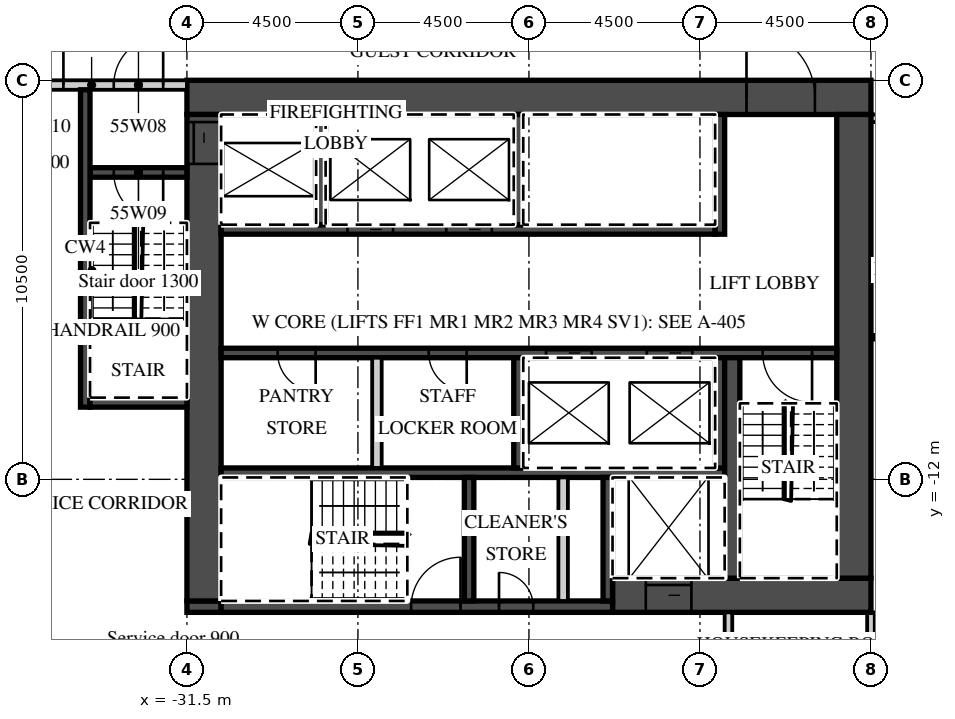
"""IFC4 building model, lengths in metres.
Left out: names, types, materials, properties, quantities, classifications, styles, units other than length and angle.
Written with IfcOpenShell. Run it as: python <this file> out.ifc"""

import sys

from ifc_helpers import new_model, si_unit, direction, frame, frame_2d, origin, place, context, subcontext, project, spatial, rectangle, extrude, element, fill, save


model = new_model("IFC4")
c1 = context("Model", 3, precision=1e-05, world=origin(), true_north=direction((0.0, 1.0)))
c2 = subcontext(c1, "Body", "Model", "MODEL_VIEW")
j1 = project(units=[si_unit("LENGTHUNIT", "METRE"), si_unit("PLANEANGLEUNIT", "RADIAN")], contexts=[c1])
p1 = place(None, origin())
s1 = spatial("IfcSite", under=j1, at=p1, CompositionType="ELEMENT")
p2 = place(p1, origin())
s2 = spatial("IfcBuilding", under=s1, at=p2, CompositionType="ELEMENT")
p3 = place(p2, frame((0.0, 0.0, 227.6)))
s3 = spatial("IfcBuildingStorey", under=s2, at=p3, CompositionType="ELEMENT", Elevation=227.6)
p4 = place(p3, frame((-13.5, -19.641, 0.0), z_axis=(0.0, 0.0, 1.0), x_axis=(0.0, 1.0, 0.0)))
e1 = element("IfcWall", 1, at=p4, inside=s3, PredefinedType="PARTITIONING", context=c2, shape_type="SweptSolid", body=[
    extrude(rectangle(XDim=4.141, YDim=0.2, at=frame_2d((2.071, 0.0))), origin(), (0.0, 0.0, 1.0), 3.02),
])
p5 = place(p3, frame((-13.5, -2.5, 0.0), z_axis=(0.0, 0.0, 1.0), x_axis=(1.0, 0.0, 0.0)))
e2 = element("IfcWall", 2, at=p5, inside=s3, PredefinedType="PARTITIONING", context=c2, shape_type="SweptSolid", body=[
    extrude(rectangle(XDim=27.0, YDim=0.2, at=frame_2d((13.5, 0.0))), origin(), (0.0, 0.0, 1.0), 3.02),
])
p6 = place(p5, frame((2.925, 0.0, 0.0)))
e3 = element("IfcOpeningElement", 3, at=p6, cuts=e2, PredefinedType="OPENING", context=c2, shape_type="SweptSolid", body=[
    extrude(rectangle(XDim=1.0, YDim=2.1, at=frame_2d((0.5, 1.05))), frame((0.0, 0.11, 0.0), z_axis=(0.0, -1.0, 0.0), x_axis=(1.0, 0.0, 0.0)), (0.0, 0.0, 1.0), 0.22),
])
p7 = place(p5, frame((9.863, 0.0, 0.0)))
e4 = element("IfcOpeningElement", 4, at=p7, cuts=e2, PredefinedType="OPENING", context=c2, shape_type="SweptSolid", body=[
    extrude(rectangle(XDim=1.2, YDim=2.1, at=frame_2d((0.6, 1.05))), frame((0.0, 0.11, 0.0), z_axis=(0.0, -1.0, 0.0), x_axis=(1.0, 0.0, 0.0)), (0.0, 0.0, 1.0), 0.22),
])
p8 = place(p5, frame((16.45, 0.0, 0.0)))
e5 = element("IfcOpeningElement", 5, at=p8, cuts=e2, PredefinedType="OPENING", context=c2, shape_type="SweptSolid", body=[
    extrude(rectangle(XDim=1.0, YDim=2.1, at=frame_2d((0.5, 1.05))), frame((0.0, 0.11, 0.0), z_axis=(0.0, -1.0, 0.0), x_axis=(1.0, 0.0, 0.0)), (0.0, 0.0, 1.0), 0.22),
])
p9 = place(p5, frame((20.925, 0.0, 0.0)))
e6 = element("IfcOpeningElement", 6, at=p9, cuts=e2, PredefinedType="OPENING", context=c2, shape_type="SweptSolid", body=[
    extrude(rectangle(XDim=1.0, YDim=2.1, at=frame_2d((0.5, 1.05))), frame((0.0, 0.11, 0.0), z_axis=(0.0, -1.0, 0.0), x_axis=(1.0, 0.0, 0.0)), (0.0, 0.0, 1.0), 0.22),
])
p10 = place(p5, frame((25.425, 0.0, 0.0)))
e7 = element("IfcOpeningElement", 7, at=p10, cuts=e2, PredefinedType="OPENING", context=c2, shape_type="SweptSolid", body=[
    extrude(rectangle(XDim=1.0, YDim=2.1, at=frame_2d((0.5, 1.05))), frame((0.0, 0.11, 0.0), z_axis=(0.0, -1.0, 0.0), x_axis=(1.0, 0.0, 0.0)), (0.0, 0.0, 1.0), 0.22),
])
p11 = place(p3, frame((-31.5, -1.95, 0.0), z_axis=(0.0, 0.0, 1.0), x_axis=(1.0, 0.0, 0.0)))
e8 = element("IfcWall", 8, at=p11, inside=s3, PredefinedType="SHEAR", context=c2, shape_type="SweptSolid", body=[
    extrude(rectangle(XDim=18.0, YDim=0.9, at=frame_2d((9.0, 0.0))), origin(), (0.0, 0.0, 1.0), 3.02),
])
p12 = place(p11, frame((14.725, 0.0, 0.0)))
e9 = element("IfcOpeningElement", 9, at=p12, cuts=e8, PredefinedType="OPENING", context=c2, shape_type="SweptSolid", body=[
    extrude(rectangle(XDim=1.8, YDim=2.1, at=frame_2d((0.9, 1.05))), frame((0.0, 0.46, 0.0), z_axis=(0.0, -1.0, 0.0), x_axis=(1.0, 0.0, 0.0)), (0.0, 0.0, 1.0), 0.92),
])
p13 = place(p3, frame((-20.3, -15.05, 0.0), z_axis=(0.0, 0.0, 1.0), x_axis=(1.0, 0.0, 0.0)))
e10 = element("IfcWall", 10, at=p13, inside=s3, PredefinedType="SHEAR", context=c2, shape_type="SweptSolid", body=[
    extrude(rectangle(XDim=6.8, YDim=0.9, at=frame_2d((3.4, 0.0))), origin(), (0.0, 0.0, 1.0), 3.02),
])
p14 = place(p13, frame((0.875, 0.0, 0.0)))
e11 = element("IfcOpeningElement", 11, at=p14, cuts=e10, PredefinedType="OPENING", context=c2, shape_type="SweptSolid", body=[
    extrude(rectangle(XDim=1.2, YDim=2.1, at=frame_2d((0.6, 1.05))), frame((0.0, 0.46, 0.0), z_axis=(0.0, -1.0, 0.0), x_axis=(1.0, 0.0, 0.0)), (0.0, 0.0, 1.0), 0.92),
])
p15 = place(p3, frame((-31.5, -15.35, 0.0), z_axis=(0.0, 0.0, 1.0), x_axis=(1.0, 0.0, 0.0)))
e12 = element("IfcWall", 12, at=p15, inside=s3, PredefinedType="SHEAR", context=c2, shape_type="SweptSolid", body=[
    extrude(rectangle(XDim=0.9, YDim=0.3, at=frame_2d((0.45, 0.0))), origin(), (0.0, 0.0, 1.0), 3.02),
])
p16 = place(p3, frame((-30.6, -15.35, 0.0), z_axis=(0.0, 0.0, 1.0), x_axis=(1.0, 0.0, 0.0)))
e13 = element("IfcWall", 13, at=p16, inside=s3, PredefinedType="SHEAR", context=c2, shape_type="SweptSolid", body=[
    extrude(rectangle(XDim=10.3, YDim=0.3, at=frame_2d((5.15, 0.0))), origin(), (0.0, 0.0, 1.0), 3.02),
])
p17 = place(p16, frame((5.0, 0.0, 0.0)))
e14 = element("IfcOpeningElement", 14, at=p17, cuts=e13, PredefinedType="OPENING", context=c2, shape_type="SweptSolid", body=[
    extrude(rectangle(XDim=1.3, YDim=2.1, at=frame_2d((0.65, 1.05))), frame((0.0, 0.16, 0.0), z_axis=(0.0, -1.0, 0.0), x_axis=(1.0, 0.0, 0.0)), (0.0, 0.0, 1.0), 0.32),
])
p18 = place(p16, frame((7.312, 0.0, 0.0)))
e15 = element("IfcOpeningElement", 15, at=p18, cuts=e13, PredefinedType="OPENING", context=c2, shape_type="SweptSolid", body=[
    extrude(rectangle(XDim=0.9, YDim=2.1, at=frame_2d((0.45, 1.05))), frame((0.0, 0.16, 0.0), z_axis=(0.0, -1.0, 0.0), x_axis=(1.0, 0.0, 0.0)), (0.0, 0.0, 1.0), 0.32),
])
p19 = place(p3, frame((-31.05, -15.2, 0.0), z_axis=(0.0, 0.0, 1.0), x_axis=(0.0, 1.0, 0.0)))
e16 = element("IfcWall", 16, at=p19, inside=s3, PredefinedType="SHEAR", context=c2, shape_type="SweptSolid", body=[
    extrude(rectangle(XDim=12.8, YDim=0.9, at=frame_2d((6.4, 0.0))), origin(), (0.0, 0.0, 1.0), 3.02),
])
p20 = place(p19, frame((11.5, 0.0, 0.0)))
e17 = element("IfcOpeningElement", 17, at=p20, cuts=e16, PredefinedType="OPENING", context=c2, shape_type="SweptSolid", body=[
    extrude(rectangle(XDim=1.1, YDim=2.1, at=frame_2d((0.55, 1.05))), frame((0.0, 0.46, 0.0), z_axis=(0.0, -1.0, 0.0), x_axis=(1.0, 0.0, 0.0)), (0.0, 0.0, 1.0), 0.92),
])
p21 = place(p3, frame((-13.95, -14.6, 0.0), z_axis=(0.0, 0.0, 1.0), x_axis=(0.0, 1.0, 0.0)))
e18 = element("IfcWall", 18, at=p21, inside=s3, PredefinedType="SHEAR", context=c2, shape_type="SweptSolid", body=[
    extrude(rectangle(XDim=12.2, YDim=0.9, at=frame_2d((6.1, 0.0))), origin(), (0.0, 0.0, 1.0), 3.02),
])
p22 = place(p3, frame((-30.6, -5.425, 0.0), z_axis=(0.0, 0.0, 1.0), x_axis=(1.0, 0.0, 0.0)))
e19 = element("IfcWall", 19, at=p22, inside=s3, PredefinedType="SHEAR", context=c2, shape_type="SweptSolid", body=[
    extrude(rectangle(XDim=13.0, YDim=0.25, at=frame_2d((6.5, 0.0))), origin(), (0.0, 0.0, 1.0), 3.02),
])
p23 = place(p22, frame((3.325, 0.0, 0.0)))
e20 = element("IfcOpeningElement", 20, at=p23, cuts=e19, PredefinedType="OPENING", context=c2, shape_type="SweptSolid", body=[
    extrude(rectangle(XDim=1.2, YDim=2.1, at=frame_2d((0.6, 1.05))), frame((0.0, 0.135, 0.0), z_axis=(0.0, -1.0, 0.0), x_axis=(1.0, 0.0, 0.0)), (0.0, 0.0, 1.0), 0.27),
])
p24 = place(p22, frame((5.925, 0.0, 0.0)))
e21 = element("IfcOpeningElement", 21, at=p24, cuts=e19, PredefinedType="OPENING", context=c2, shape_type="SweptSolid", body=[
    extrude(rectangle(XDim=1.2, YDim=2.1, at=frame_2d((0.6, 1.05))), frame((0.0, 0.135, 0.0), z_axis=(0.0, -1.0, 0.0), x_axis=(1.0, 0.0, 0.0)), (0.0, 0.0, 1.0), 0.27),
])
p25 = place(p3, frame((-17.475, -5.55, 0.0), z_axis=(0.0, 0.0, 1.0), x_axis=(0.0, 1.0, 0.0)))
e22 = element("IfcWall", 22, at=p25, inside=s3, PredefinedType="SHEAR", context=c2, shape_type="SweptSolid", body=[
    extrude(rectangle(XDim=3.15, YDim=0.25, at=frame_2d((1.575, 0.0))), origin(), (0.0, 0.0, 1.0), 3.02),
])
for number, where, z_axis, x_axis in (
    (23, (-27.975, -5.3, 0.0), (0.0, 0.0, 1.0), (0.0, 1.0, 0.0)),
    (24, (-22.775, -5.3, 0.0), (0.0, 0.0, 1.0), (0.0, 1.0, 0.0)),
):
    element("IfcWall", number, at=place(p3, frame(where, z_axis=z_axis, x_axis=x_axis)), inside=s3, PredefinedType="SHEAR", context=c2, shape_type="SweptSolid", body=[
        extrude(rectangle(XDim=2.9, YDim=0.25, at=frame_2d((1.45, 0.0))), origin(), (0.0, 0.0, 1.0), 3.02),
    ])
p26 = place(p3, frame((-30.6, -8.675, 0.0), z_axis=(0.0, 0.0, 1.0), x_axis=(1.0, 0.0, 0.0)))
e25 = element("IfcWall", 25, at=p26, inside=s3, PredefinedType="SHEAR", context=c2, shape_type="SweptSolid", body=[
    extrude(rectangle(XDim=16.2, YDim=0.25, at=frame_2d((8.1, 0.0))), origin(), (0.0, 0.0, 1.0), 3.02),
])
p27 = place(p26, frame((8.55, 0.0, 0.0)))
e26 = element("IfcOpeningElement", 26, at=p27, cuts=e25, PredefinedType="OPENING", context=c2, shape_type="SweptSolid", body=[
    extrude(rectangle(XDim=1.2, YDim=2.1, at=frame_2d((0.6, 1.05))), frame((0.0, 0.135, 0.0), z_axis=(0.0, -1.0, 0.0), x_axis=(1.0, 0.0, 0.0)), (0.0, 0.0, 1.0), 0.27),
])
p28 = place(p26, frame((11.2, 0.0, 0.0)))
e27 = element("IfcOpeningElement", 27, at=p28, cuts=e25, PredefinedType="OPENING", context=c2, shape_type="SweptSolid", body=[
    extrude(rectangle(XDim=1.2, YDim=2.1, at=frame_2d((0.6, 1.05))), frame((0.0, 0.135, 0.0), z_axis=(0.0, -1.0, 0.0), x_axis=(1.0, 0.0, 0.0)), (0.0, 0.0, 1.0), 0.27),
])
p29 = place(p26, frame((14.25, 0.0, 0.0)))
e28 = element("IfcOpeningElement", 28, at=p29, cuts=e25, PredefinedType="OPENING", context=c2, shape_type="SweptSolid", body=[
    extrude(rectangle(XDim=1.3, YDim=2.1, at=frame_2d((0.65, 1.05))), frame((0.0, 0.135, 0.0), z_axis=(0.0, -1.0, 0.0), x_axis=(1.0, 0.0, 0.0)), (0.0, 0.0, 1.0), 0.27),
])
p30 = place(p26, frame((1.488, 0.0, 0.0)))
e29 = element("IfcOpeningElement", 29, at=p30, cuts=e25, PredefinedType="OPENING", context=c2, shape_type="SweptSolid", body=[
    extrude(rectangle(XDim=1.0, YDim=2.1, at=frame_2d((0.5, 1.05))), frame((0.0, 0.135, 0.0), z_axis=(0.0, -1.0, 0.0), x_axis=(1.0, 0.0, 0.0)), (0.0, 0.0, 1.0), 0.27),
])
p31 = place(p26, frame((5.462, 0.0, 0.0)))
e30 = element("IfcOpeningElement", 30, at=p31, cuts=e25, PredefinedType="OPENING", context=c2, shape_type="SweptSolid", body=[
    extrude(rectangle(XDim=1.0, YDim=2.1, at=frame_2d((0.5, 1.05))), frame((0.0, 0.135, 0.0), z_axis=(0.0, -1.0, 0.0), x_axis=(1.0, 0.0, 0.0)), (0.0, 0.0, 1.0), 0.27),
])
p32 = place(p3, frame((-30.6, -11.825, 0.0), z_axis=(0.0, 0.0, 1.0), x_axis=(1.0, 0.0, 0.0)))
e31 = element("IfcWall", 31, at=p32, inside=s3, PredefinedType="SHEAR", context=c2, shape_type="SweptSolid", body=[
    extrude(rectangle(XDim=13.25, YDim=0.25, at=frame_2d((6.625, 0.0))), origin(), (0.0, 0.0, 1.0), 3.02),
])
for number, where, z_axis, x_axis in (
    (32, (-17.475, -11.7, 0.0), (0.0, 0.0, 1.0), (0.0, 1.0, 0.0)),
    (33, (-22.775, -11.7, 0.0), (0.0, 0.0, 1.0), (0.0, 1.0, 0.0)),
):
    element("IfcWall", number, at=place(p3, frame(where, z_axis=z_axis, x_axis=x_axis)), inside=s3, PredefinedType="SHEAR", context=c2, shape_type="SweptSolid", body=[
        extrude(rectangle(XDim=2.9, YDim=0.25, at=frame_2d((1.45, 0.0))), origin(), (0.0, 0.0, 1.0), 3.02),
    ])
p33 = place(p3, frame((-26.5, -11.7, 0.0), z_axis=(0.0, 0.0, 1.0), x_axis=(0.0, 1.0, 0.0)))
e34 = element("IfcWall", 34, at=p33, inside=s3, PredefinedType="PARTITIONING", context=c2, shape_type="SweptSolid", body=[
    extrude(rectangle(XDim=2.9, YDim=0.25, at=frame_2d((1.45, 0.0))), origin(), (0.0, 0.0, 1.0), 3.02),
])
p34 = place(p3, frame((-17.15, -14.6, 0.0), z_axis=(0.0, 0.0, 1.0), x_axis=(0.0, 1.0, 0.0)))
e35 = element("IfcWall", 35, at=p34, inside=s3, PredefinedType="SHEAR", context=c2, shape_type="SweptSolid", body=[
    extrude(rectangle(XDim=5.8, YDim=0.4, at=frame_2d((2.9, 0.0))), origin(), (0.0, 0.0, 1.0), 3.02),
])
for number, where, z_axis, x_axis in (
    (36, (-20.425, -15.2, 0.0), (0.0, 0.0, 1.0), (0.0, 1.0, 0.0)),
    (37, (-24.075, -15.2, 0.0), (0.0, 0.0, 1.0), (0.0, 1.0, 0.0)),
):
    element("IfcWall", number, at=place(p3, frame(where, z_axis=z_axis, x_axis=x_axis)), inside=s3, PredefinedType="SHEAR", context=c2, shape_type="SweptSolid", body=[
        extrude(rectangle(XDim=3.25, YDim=0.25, at=frame_2d((1.625, 0.0))), origin(), (0.0, 0.0, 1.0), 3.02),
    ])
p35 = place(p3, frame((-21.6, -15.2, 0.0), z_axis=(0.0, 0.0, 1.0), x_axis=(0.0, 1.0, 0.0)))
e38 = element("IfcWall", 38, at=p35, inside=s3, PredefinedType="PARTITIONING", context=c2, shape_type="SweptSolid", body=[
    extrude(rectangle(XDim=3.25, YDim=0.25, at=frame_2d((1.625, 0.0))), origin(), (0.0, 0.0, 1.0), 3.02),
])
p36 = place(p3, frame((-36.515, -1.625, 0.0), z_axis=(0.0, 0.0, 1.0), x_axis=(1.0, 0.0, 0.0)))
e39 = element("IfcWall", 39, at=p36, inside=s3, PredefinedType="PARTITIONING", context=c2, shape_type="SweptSolid", body=[
    extrude(rectangle(XDim=5.015, YDim=0.25, at=frame_2d((2.508, 0.0))), origin(), (0.0, 0.0, 1.0), 3.02),
])
p37 = place(p36, frame((3.09, 0.0, 0.0)))
e40 = element("IfcOpeningElement", 40, at=p37, cuts=e39, PredefinedType="OPENING", context=c2, shape_type="SweptSolid", body=[
    extrude(rectangle(XDim=1.3, YDim=2.1, at=frame_2d((0.65, 1.05))), frame((0.0, 0.135, 0.0), z_axis=(0.0, -1.0, 0.0), x_axis=(1.0, 0.0, 0.0)), (0.0, 0.0, 1.0), 0.27),
])
p38 = place(p36, frame((0.665, 0.0, 0.0)))
e41 = element("IfcOpeningElement", 41, at=p38, cuts=e39, PredefinedType="OPENING", context=c2, shape_type="SweptSolid", body=[
    extrude(rectangle(XDim=1.1, YDim=2.1, at=frame_2d((0.55, 1.05))), frame((0.0, 0.135, 0.0), z_axis=(0.0, -1.0, 0.0), x_axis=(1.0, 0.0, 0.0)), (0.0, 0.0, 1.0), 0.27),
])
p39 = place(p3, frame((-34.05, -3.925, 0.0), z_axis=(0.0, 0.0, 1.0), x_axis=(1.0, 0.0, 0.0)))
e42 = element("IfcWall", 42, at=p39, inside=s3, PredefinedType="SHEAR", context=c2, shape_type="SweptSolid", body=[
    extrude(rectangle(XDim=2.55, YDim=0.25, at=frame_2d((1.275, 0.0))), origin(), (0.0, 0.0, 1.0), 3.02),
])
p40 = place(p39, frame((0.625, 0.0, 0.0)))
e43 = element("IfcOpeningElement", 43, at=p40, cuts=e42, PredefinedType="OPENING", context=c2, shape_type="SweptSolid", body=[
    extrude(rectangle(XDim=1.3, YDim=2.1, at=frame_2d((0.65, 1.05))), frame((0.0, 0.135, 0.0), z_axis=(0.0, -1.0, 0.0), x_axis=(1.0, 0.0, 0.0)), (0.0, 0.0, 1.0), 0.27),
])
p41 = place(p3, frame((-34.175, -10.1, 0.0), z_axis=(0.0, 0.0, 1.0), x_axis=(0.0, 1.0, 0.0)))
e44 = element("IfcWall", 44, at=p41, inside=s3, PredefinedType="SHEAR", context=c2, shape_type="SweptSolid", body=[
    extrude(rectangle(XDim=8.35, YDim=0.25, at=frame_2d((4.175, 0.0))), origin(), (0.0, 0.0, 1.0), 3.02),
])
p42 = place(p3, frame((-34.05, -9.975, 0.0), z_axis=(0.0, 0.0, 1.0), x_axis=(1.0, 0.0, 0.0)))
e45 = element("IfcWall", 45, at=p42, inside=s3, PredefinedType="SHEAR", context=c2, shape_type="SweptSolid", body=[
    extrude(rectangle(XDim=2.55, YDim=0.25, at=frame_2d((1.275, 0.0))), origin(), (0.0, 0.0, 1.0), 3.02),
])
p43 = place(p3, frame((-17.25, -17.7, 0.0), z_axis=(0.0, 0.0, 1.0), x_axis=(0.0, 1.0, 0.0)))
e46 = element("IfcWall", 46, at=p43, inside=s3, PredefinedType="PARTITIONING", context=c2, shape_type="SweptSolid", body=[
    extrude(rectangle(XDim=2.2, YDim=0.2, at=frame_2d((1.1, 0.0))), origin(), (0.0, 0.0, 1.0), 3.02),
])
p44 = place(p27, origin())
e47 = element("IfcDoor", 47, at=p44, inside=s3, OperationType="SLIDING_TO_LEFT", PredefinedType="DOOR", context=c2, shape_type="SweptSolid", body=[
    extrude(rectangle(XDim=1.2, YDim=2.1, at=frame_2d((0.6, 1.05))), frame((0.0, 0.025, 0.0), z_axis=(0.0, -1.0, 0.0), x_axis=(1.0, 0.0, 0.0)), (0.0, 0.0, 1.0), 0.05),
])
fill(e26, e47)
p45 = place(p28, origin())
e48 = element("IfcDoor", 48, at=p45, inside=s3, OperationType="SLIDING_TO_RIGHT", PredefinedType="DOOR", context=c2, shape_type="SweptSolid", body=[
    extrude(rectangle(XDim=1.2, YDim=2.1, at=frame_2d((0.6, 1.05))), frame((0.0, 0.025, 0.0), z_axis=(0.0, -1.0, 0.0), x_axis=(1.0, 0.0, 0.0)), (0.0, 0.0, 1.0), 0.05),
])
fill(e27, e48)
p46 = place(p23, origin())
e49 = element("IfcDoor", 49, at=p46, inside=s3, OperationType="SLIDING_TO_RIGHT", PredefinedType="DOOR", context=c2, shape_type="SweptSolid", body=[
    extrude(rectangle(XDim=1.2, YDim=2.1, at=frame_2d((0.6, 1.05))), frame((0.0, 0.025, 0.0), z_axis=(0.0, -1.0, 0.0), x_axis=(1.0, 0.0, 0.0)), (0.0, 0.0, 1.0), 0.05),
])
fill(e20, e49)
p47 = place(p24, origin())
e50 = element("IfcDoor", 50, at=p47, inside=s3, OperationType="SLIDING_TO_RIGHT", PredefinedType="DOOR", context=c2, shape_type="SweptSolid", body=[
    extrude(rectangle(XDim=1.2, YDim=2.1, at=frame_2d((0.6, 1.05))), frame((0.0, 0.025, 0.0), z_axis=(0.0, -1.0, 0.0), x_axis=(1.0, 0.0, 0.0)), (0.0, 0.0, 1.0), 0.05),
])
fill(e21, e50)
p48 = place(p14, origin())
e51 = element("IfcDoor", 51, at=p48, inside=s3, OperationType="SLIDING_TO_LEFT", PredefinedType="DOOR", context=c2, shape_type="SweptSolid", body=[
    extrude(rectangle(XDim=1.2, YDim=2.1, at=frame_2d((0.6, 1.05))), frame((0.0, 0.025, 0.0), z_axis=(0.0, -1.0, 0.0), x_axis=(1.0, 0.0, 0.0)), (0.0, 0.0, 1.0), 0.05),
])
fill(e11, e51)
p49 = place(p20, origin())
e52 = element("IfcDoor", 52, at=p49, inside=s3, OperationType="SLIDING_TO_RIGHT", PredefinedType="DOOR", context=c2, shape_type="SweptSolid", body=[
    extrude(rectangle(XDim=1.1, YDim=2.1, at=frame_2d((0.55, 1.05))), frame((0.0, 0.025, 0.0), z_axis=(0.0, -1.0, 0.0), x_axis=(1.0, 0.0, 0.0)), (0.0, 0.0, 1.0), 0.05),
])
fill(e17, e52)
p50 = place(p12, origin())
e53 = element("IfcDoor", 53, at=p50, inside=s3, OperationType="DOUBLE_DOOR_DOUBLE_SWING", PredefinedType="DOOR", context=c2, shape_type="SweptSolid", body=[
    extrude(rectangle(XDim=1.8, YDim=2.1, at=frame_2d((0.9, 1.05))), frame((0.0, 0.025, 0.0), z_axis=(0.0, -1.0, 0.0), x_axis=(1.0, 0.0, 0.0)), (0.0, 0.0, 1.0), 0.05),
])
fill(e9, e53)
p51 = place(p37, origin())
e54 = element("IfcDoor", 54, at=p51, inside=s3, OperationType="SINGLE_SWING_RIGHT", PredefinedType="DOOR", context=c2, shape_type="SweptSolid", body=[
    extrude(rectangle(XDim=1.3, YDim=2.1, at=frame_2d((0.65, 1.05))), frame((0.0, 0.025, 0.0), z_axis=(0.0, -1.0, 0.0), x_axis=(1.0, 0.0, 0.0)), (0.0, 0.0, 1.0), 0.05),
])
fill(e40, e54)
p52 = place(p40, origin())
e55 = element("IfcDoor", 55, at=p52, inside=s3, OperationType="SINGLE_SWING_RIGHT", PredefinedType="DOOR", context=c2, shape_type="SweptSolid", body=[
    extrude(rectangle(XDim=1.3, YDim=2.1, at=frame_2d((0.65, 1.05))), frame((0.0, 0.025, 0.0), z_axis=(0.0, -1.0, 0.0), x_axis=(1.0, 0.0, 0.0)), (0.0, 0.0, 1.0), 0.05),
])
fill(e43, e55)
p53 = place(p38, origin())
e56 = element("IfcDoor", 56, at=p53, inside=s3, OperationType="SINGLE_SWING_RIGHT", PredefinedType="DOOR", context=c2, shape_type="SweptSolid", body=[
    extrude(rectangle(XDim=1.1, YDim=2.1, at=frame_2d((0.55, 1.05))), frame((0.0, 0.025, 0.0), z_axis=(0.0, -1.0, 0.0), x_axis=(1.0, 0.0, 0.0)), (0.0, 0.0, 1.0), 0.05),
])
fill(e41, e56)
p54 = place(p29, origin())
e57 = element("IfcDoor", 57, at=p54, inside=s3, OperationType="SINGLE_SWING_RIGHT", PredefinedType="DOOR", context=c2, shape_type="SweptSolid", body=[
    extrude(rectangle(XDim=1.3, YDim=2.1, at=frame_2d((0.65, 1.05))), frame((0.0, 0.025, 0.0), z_axis=(0.0, -1.0, 0.0), x_axis=(1.0, 0.0, 0.0)), (0.0, 0.0, 1.0), 0.05),
])
fill(e28, e57)
p55 = place(p17, origin())
e58 = element("IfcDoor", 58, at=p55, inside=s3, OperationType="SINGLE_SWING_RIGHT", PredefinedType="DOOR", context=c2, shape_type="SweptSolid", body=[
    extrude(rectangle(XDim=1.3, YDim=2.1, at=frame_2d((0.65, 1.05))), frame((0.0, 0.025, 0.0), z_axis=(0.0, -1.0, 0.0), x_axis=(1.0, 0.0, 0.0)), (0.0, 0.0, 1.0), 0.05),
])
fill(e14, e58)
p56 = place(p18, origin())
e59 = element("IfcDoor", 59, at=p56, inside=s3, OperationType="SINGLE_SWING_LEFT", PredefinedType="DOOR", context=c2, shape_type="SweptSolid", body=[
    extrude(rectangle(XDim=0.9, YDim=2.1, at=frame_2d((0.45, 1.05))), frame((0.0, 0.025, 0.0), z_axis=(0.0, -1.0, 0.0), x_axis=(1.0, 0.0, 0.0)), (0.0, 0.0, 1.0), 0.05),
])
fill(e15, e59)
p57 = place(p30, origin())
e60 = element("IfcDoor", 60, at=p57, inside=s3, OperationType="SINGLE_SWING_RIGHT", PredefinedType="DOOR", context=c2, shape_type="SweptSolid", body=[
    extrude(rectangle(XDim=1.0, YDim=2.1, at=frame_2d((0.5, 1.05))), frame((0.0, 0.025, 0.0), z_axis=(0.0, -1.0, 0.0), x_axis=(1.0, 0.0, 0.0)), (0.0, 0.0, 1.0), 0.05),
])
fill(e29, e60)
p58 = place(p31, origin())
e61 = element("IfcDoor", 61, at=p58, inside=s3, OperationType="SINGLE_SWING_RIGHT", PredefinedType="DOOR", context=c2, shape_type="SweptSolid", body=[
    extrude(rectangle(XDim=1.0, YDim=2.1, at=frame_2d((0.5, 1.05))), frame((0.0, 0.025, 0.0), z_axis=(0.0, -1.0, 0.0), x_axis=(1.0, 0.0, 0.0)), (0.0, 0.0, 1.0), 0.05),
])
fill(e30, e61)
save(model, sys.argv[1])
